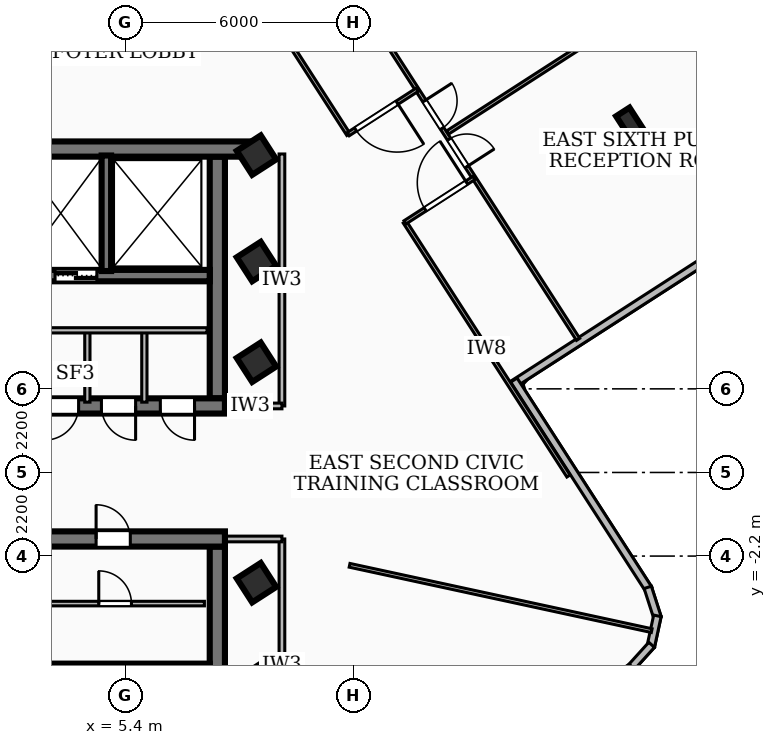
"""IFC4 building model, lengths in metres.
Left out: names, types, materials, properties, quantities, classifications, styles, units other than length and angle.
Written with IfcOpenShell. Run it as: python <this file> out.ifc"""

import sys

from ifc_helpers import new_model, si_unit, direction, frame, frame_2d, origin, origin_2d, place, context, subcontext, project, spatial, rectangle, i_section, extrude, element, fill, save


model = new_model("IFC4")
c1 = context("Model", 3, precision=1e-05, world=origin(), true_north=direction((0.0, 1.0)))
c2 = subcontext(c1, "Body", "Model", "MODEL_VIEW")
j1 = project(units=[si_unit("LENGTHUNIT", "METRE"), si_unit("PLANEANGLEUNIT", "RADIAN")], contexts=[c1])
p1 = place(None, origin())
s1 = spatial("IfcSite", under=j1, at=p1, CompositionType="ELEMENT")
p2 = place(p1, origin())
s2 = spatial("IfcBuilding", under=s1, at=p2, CompositionType="ELEMENT")
p3 = place(p2, frame((0.0, 0.0, 218.88)))
s3 = spatial("IfcBuildingStorey", under=s2, at=p3, CompositionType="ELEMENT", Elevation=218.88)
p4 = place(p3, frame((-8.78, 8.51, 0.0), z_axis=(0.0, 0.0, 1.0), x_axis=(1.0, 0.0, 0.0)))
e1 = element("IfcWall", 1, at=p4, inside=s3, PredefinedType="SHEAR", context=c2, shape_type="SweptSolid", body=[
    extrude(rectangle(XDim=17.56, YDim=0.4, at=frame_2d((8.78, 0.0))), origin(), (0.0, 0.0, 1.0), 3.14),
])
p5 = place(p3, frame((8.02, 1.75, 0.0), z_axis=(0.0, 0.0, 1.0), x_axis=(-1.0, 0.0, 0.0)))
e2 = element("IfcWall", 2, at=p5, inside=s3, PredefinedType="SHEAR", context=c2, shape_type="SweptSolid", body=[
    extrude(rectangle(XDim=16.04, YDim=0.4, at=frame_2d((8.02, 0.0))), origin(), (0.0, 0.0, 1.0), 3.14),
])
p6 = place(p5, frame((7.45, 0.0, 0.0)))
e3 = element("IfcOpeningElement", 3, at=p6, cuts=e2, PredefinedType="OPENING", context=c2, shape_type="SweptSolid", body=[
    extrude(rectangle(XDim=1.0, YDim=2.1, at=frame_2d((0.5, 1.05))), frame((0.0, 0.21, 0.0), z_axis=(0.0, -1.0, 0.0), x_axis=(1.0, 0.0, 0.0)), (0.0, 0.0, 1.0), 0.42),
])
p7 = place(p5, frame((14.285, 0.0, 0.0)))
e4 = element("IfcOpeningElement", 4, at=p7, cuts=e2, PredefinedType="OPENING", context=c2, shape_type="SweptSolid", body=[
    extrude(rectangle(XDim=1.05, YDim=2.15, at=frame_2d((0.525, 1.075))), frame((0.0, 0.21, 0.0), z_axis=(0.0, -1.0, 0.0), x_axis=(1.0, 0.0, 0.0)), (0.0, 0.0, 1.0), 0.42),
])
p8 = place(p5, frame((12.725, 0.0, 0.0)))
e5 = element("IfcOpeningElement", 5, at=p8, cuts=e2, PredefinedType="OPENING", context=c2, shape_type="SweptSolid", body=[
    extrude(rectangle(XDim=1.05, YDim=2.15, at=frame_2d((0.525, 1.075))), frame((0.0, 0.21, 0.0), z_axis=(0.0, -1.0, 0.0), x_axis=(1.0, 0.0, 0.0)), (0.0, 0.0, 1.0), 0.42),
])
p9 = place(p5, frame((11.165, 0.0, 0.0)))
e6 = element("IfcOpeningElement", 6, at=p9, cuts=e2, PredefinedType="OPENING", context=c2, shape_type="SweptSolid", body=[
    extrude(rectangle(XDim=1.05, YDim=2.15, at=frame_2d((0.525, 1.075))), frame((0.0, 0.21, 0.0), z_axis=(0.0, -1.0, 0.0), x_axis=(1.0, 0.0, 0.0)), (0.0, 0.0, 1.0), 0.42),
])
p10 = place(p5, frame((3.85, 0.0, 0.0)))
e7 = element("IfcOpeningElement", 7, at=p10, cuts=e2, PredefinedType="OPENING", context=c2, shape_type="SweptSolid", body=[
    extrude(rectangle(XDim=0.9, YDim=2.06, at=frame_2d((0.45, 1.03))), frame((0.0, 0.21, 0.0), z_axis=(0.0, -1.0, 0.0), x_axis=(1.0, 0.0, 0.0)), (0.0, 0.0, 1.0), 0.42),
])
p11 = place(p5, frame((2.35, 0.0, 0.0)))
e8 = element("IfcOpeningElement", 8, at=p11, cuts=e2, PredefinedType="OPENING", context=c2, shape_type="SweptSolid", body=[
    extrude(rectangle(XDim=0.9, YDim=2.06, at=frame_2d((0.45, 1.03))), frame((0.0, 0.21, 0.0), z_axis=(0.0, -1.0, 0.0), x_axis=(1.0, 0.0, 0.0)), (0.0, 0.0, 1.0), 0.42),
])
p12 = place(p5, frame((0.8, 0.0, 0.0)))
e9 = element("IfcOpeningElement", 9, at=p12, cuts=e2, PredefinedType="OPENING", context=c2, shape_type="SweptSolid", body=[
    extrude(rectangle(XDim=0.9, YDim=2.06, at=frame_2d((0.45, 1.03))), frame((0.0, 0.21, 0.0), z_axis=(0.0, -1.0, 0.0), x_axis=(1.0, 0.0, 0.0)), (0.0, 0.0, 1.0), 0.42),
])
p13 = place(p3, frame((7.82, 8.31, 0.0), z_axis=(0.0, 0.0, 1.0), x_axis=(0.0, -1.0, 0.0)))
e10 = element("IfcWall", 10, at=p13, inside=s3, PredefinedType="SHEAR", context=c2, shape_type="SweptSolid", body=[
    extrude(rectangle(XDim=6.36, YDim=0.4, at=frame_2d((3.18, 0.0))), origin(), (0.0, 0.0, 1.0), 3.14),
])
p14 = place(p3, frame((7.62, 5.18, 0.0), z_axis=(0.0, 0.0, 1.0), x_axis=(-1.0, 0.0, 0.0)))
e11 = element("IfcWall", 11, at=p14, inside=s3, PredefinedType="SOLIDWALL", context=c2, shape_type="SweptSolid", body=[
    extrude(rectangle(XDim=15.24, YDim=0.3, at=frame_2d((7.62, 0.0))), origin(), (0.0, 0.0, 1.0), 3.14),
])
p15 = place(p14, frame((5.77, 0.0, 0.0)))
e12 = element("IfcOpeningElement", 12, at=p15, cuts=e11, PredefinedType="OPENING", context=c2, shape_type="SweptSolid", body=[
    extrude(rectangle(XDim=1.1, YDim=2.15, at=frame_2d((0.55, 1.075))), frame((0.0, 0.16, 0.0), z_axis=(0.0, -1.0, 0.0), x_axis=(1.0, 0.0, 0.0)), (0.0, 0.0, 1.0), 0.32),
])
p16 = place(p14, frame((2.97, 0.0, 0.0)))
e13 = element("IfcOpeningElement", 13, at=p16, cuts=e11, PredefinedType="OPENING", context=c2, shape_type="SweptSolid", body=[
    extrude(rectangle(XDim=1.1, YDim=2.15, at=frame_2d((0.55, 1.075))), frame((0.0, 0.16, 0.0), z_axis=(0.0, -1.0, 0.0), x_axis=(1.0, 0.0, 0.0)), (0.0, 0.0, 1.0), 0.32),
])
p17 = place(p14, frame((7.97, 0.0, 0.0)))
e14 = element("IfcOpeningElement", 14, at=p17, cuts=e11, PredefinedType="OPENING", context=c2, shape_type="SweptSolid", body=[
    extrude(rectangle(XDim=1.0, YDim=2.1, at=frame_2d((0.5, 1.05))), frame((0.0, 0.16, 0.0), z_axis=(0.0, -1.0, 0.0), x_axis=(1.0, 0.0, 0.0)), (0.0, 0.0, 1.0), 0.32),
])
p18 = place(p3, frame((-8.02, -1.75, 0.0), z_axis=(0.0, 0.0, 1.0), x_axis=(1.0, 0.0, 0.0)))
e15 = element("IfcWall", 15, at=p18, inside=s3, PredefinedType="SHEAR", context=c2, shape_type="SweptSolid", body=[
    extrude(rectangle(XDim=16.04, YDim=0.4, at=frame_2d((8.02, 0.0))), origin(), (0.0, 0.0, 1.0), 3.14),
])
p19 = place(p18, frame((7.45, 0.0, 0.0)))
e16 = element("IfcOpeningElement", 16, at=p19, cuts=e15, PredefinedType="OPENING", context=c2, shape_type="SweptSolid", body=[
    extrude(rectangle(XDim=1.0, YDim=2.1, at=frame_2d((0.5, 1.05))), frame((0.0, 0.21, 0.0), z_axis=(0.0, -1.0, 0.0), x_axis=(1.0, 0.0, 0.0)), (0.0, 0.0, 1.0), 0.42),
])
p20 = place(p18, frame((12.65, 0.0, 0.0)))
e17 = element("IfcOpeningElement", 17, at=p20, cuts=e15, PredefinedType="OPENING", context=c2, shape_type="SweptSolid", body=[
    extrude(rectangle(XDim=0.9, YDim=2.06, at=frame_2d((0.45, 1.03))), frame((0.0, 0.21, 0.0), z_axis=(0.0, -1.0, 0.0), x_axis=(1.0, 0.0, 0.0)), (0.0, 0.0, 1.0), 0.42),
])
p21 = place(p18, frame((2.25, 0.0, 0.0)))
e18 = element("IfcOpeningElement", 18, at=p21, cuts=e15, PredefinedType="OPENING", context=c2, shape_type="SweptSolid", body=[
    extrude(rectangle(XDim=0.9, YDim=2.06, at=frame_2d((0.45, 1.03))), frame((0.0, 0.21, 0.0), z_axis=(0.0, -1.0, 0.0), x_axis=(1.0, 0.0, 0.0)), (0.0, 0.0, 1.0), 0.42),
])
p22 = place(p3, frame((7.82, -1.95, 0.0), z_axis=(0.0, 0.0, 1.0), x_axis=(0.0, -1.0, 0.0)))
e19 = element("IfcWall", 19, at=p22, inside=s3, PredefinedType="SHEAR", context=c2, shape_type="SweptSolid", body=[
    extrude(rectangle(XDim=6.36, YDim=0.4, at=frame_2d((3.18, 0.0))), origin(), (0.0, 0.0, 1.0), 3.14),
])
p23 = place(p3, frame((-7.62, -5.18, 0.0), z_axis=(0.0, 0.0, 1.0), x_axis=(1.0, 0.0, 0.0)))
e20 = element("IfcWall", 20, at=p23, inside=s3, PredefinedType="SOLIDWALL", context=c2, shape_type="SweptSolid", body=[
    extrude(rectangle(XDim=15.24, YDim=0.3, at=frame_2d((7.62, 0.0))), origin(), (0.0, 0.0, 1.0), 3.14),
])
p24 = place(p23, frame((5.77, 0.0, 0.0)))
e21 = element("IfcOpeningElement", 21, at=p24, cuts=e20, PredefinedType="OPENING", context=c2, shape_type="SweptSolid", body=[
    extrude(rectangle(XDim=1.1, YDim=2.15, at=frame_2d((0.55, 1.075))), frame((0.0, 0.16, 0.0), z_axis=(0.0, -1.0, 0.0), x_axis=(1.0, 0.0, 0.0)), (0.0, 0.0, 1.0), 0.32),
])
p25 = place(p23, frame((7.97, 0.0, 0.0)))
e22 = element("IfcOpeningElement", 22, at=p25, cuts=e20, PredefinedType="OPENING", context=c2, shape_type="SweptSolid", body=[
    extrude(rectangle(XDim=1.0, YDim=2.1, at=frame_2d((0.5, 1.05))), frame((0.0, 0.16, 0.0), z_axis=(0.0, -1.0, 0.0), x_axis=(1.0, 0.0, 0.0)), (0.0, 0.0, 1.0), 0.32),
])
p26 = place(p3, frame((4.9, 5.3, 0.0), z_axis=(0.0, 0.0, 1.0), x_axis=(0.0, 1.0, 0.0)))
e23 = element("IfcWall", 23, at=p26, inside=s3, PredefinedType="SOLIDWALL", context=c2, shape_type="SweptSolid", body=[
    extrude(rectangle(XDim=3.04, YDim=0.25, at=frame_2d((1.52, 0.0))), origin(), (0.0, 0.0, 1.0), 3.14),
])
for number, where, z_axis, x_axis in (
    (24, (8.85, -5.55, 0.0), (0.0, 0.0, 1.0), (0.841, 0.542, 0.0)),
    (25, (8.85, -2.9, 0.0), (0.0, 0.0, 1.0), (0.841, 0.542, 0.0)),
    (26, (8.85, 2.9, 0.0), (0.0, 0.0, 1.0), (0.841, 0.542, 0.0)),
    (27, (8.85, 5.55, 0.0), (0.0, 0.0, 1.0), (0.841, 0.542, 0.0)),
    (28, (8.85, 8.35, 0.0), (0.0, 0.0, 1.0), (0.841, 0.542, 0.0)),
):
    element("IfcColumn", number, at=place(p3, frame(where, z_axis=z_axis, x_axis=x_axis)), inside=s3, PredefinedType="COLUMN", context=c2, shape_type="SweptSolid", body=[
        extrude(rectangle(XDim=0.75, YDim=0.75, at=origin_2d()), origin(), (0.0, 0.0, 1.0), 3.42),
    ])
p27 = place(p3, frame((18.741, 9.097, 0.0), z_axis=(0.0, 0.0, 1.0), x_axis=(0.840566603496, 0.541708210283, 0.0)))
e29 = element("IfcColumn", 29, at=p27, inside=s3, PredefinedType="COLUMN", context=c2, shape_type="SweptSolid", body=[
    extrude(i_section(OverallWidth=0.418, OverallDepth=0.927, WebThickness=0.019, FlangeThickness=0.032, at=origin_2d()), origin(), (0.0, 0.0, 1.0), 3.42),
])
p28 = place(p3, frame((18.155, 17.425, 0.0), z_axis=(0.0, 0.0, 1.0), x_axis=(0.541713039183, -0.840563491462, 0.0)))
e30 = element("IfcWall", 30, at=p28, inside=s3, PredefinedType="SOLIDWALL", context=c2, shape_type="SweptSolid", body=[
    extrude(rectangle(XDim=9.824, YDim=0.2, at=frame_2d((4.912, 0.0))), origin(), (0.0, 0.0, 1.0), 3.14),
])
p29 = place(p28, frame((6.313, 0.0, 0.85)))
e31 = element("IfcOpeningElement", 31, at=p29, cuts=e30, PredefinedType="OPENING", context=c2, shape_type="SweptSolid", body=[
    extrude(rectangle(XDim=2.7, YDim=1.65, at=frame_2d((1.35, 0.825))), frame((0.0, 0.11, 0.0), z_axis=(0.0, -1.0, 0.0), x_axis=(1.0, 0.0, 0.0)), (0.0, 0.0, 1.0), 0.22),
])
p30 = place(p3, frame((23.032, 7.111, 0.0), z_axis=(0.0, 0.0, 1.0), x_axis=(-0.840540020681, -0.541749456515, 0.0)))
e32 = element("IfcWall", 32, at=p30, inside=s3, PredefinedType="SOLIDWALL", context=c2, shape_type="SweptSolid", body=[
    extrude(rectangle(XDim=8.842, YDim=0.2, at=frame_2d((4.421, 0.0))), origin(), (0.0, 0.0, 1.0), 3.14),
])
p31 = place(p30, frame((0.85, 0.0, 0.85)))
e33 = element("IfcOpeningElement", 33, at=p31, cuts=e32, PredefinedType="OPENING", context=c2, shape_type="SweptSolid", body=[
    extrude(rectangle(XDim=1.5, YDim=1.8, at=frame_2d((0.75, 0.9))), frame((0.0, 0.11, 0.0), z_axis=(0.0, -1.0, 0.0), x_axis=(1.0, 0.0, 0.0)), (0.0, 0.0, 1.0), 0.22),
])
p32 = place(p3, frame((15.624, 2.431, 0.0), z_axis=(0.0, 0.0, 1.0), x_axis=(0.541715396451, -0.840561972283, 0.0)))
e34 = element("IfcWall", 34, at=p32, inside=s3, PredefinedType="SOLIDWALL", context=c2, shape_type="SweptSolid", body=[
    extrude(rectangle(XDim=6.542, YDim=0.2, at=frame_2d((3.271, 0.0))), origin(), (0.0, 0.0, 1.0), 3.14),
])
p33 = place(p3, frame((19.146, -3.023, 0.0), z_axis=(0.0, 0.0, 1.0), x_axis=(0.306602907463, -0.951837516142, 0.0)))
e35 = element("IfcWall", 35, at=p33, inside=s3, PredefinedType="SOLIDWALL", context=c2, shape_type="SweptSolid", body=[
    extrude(rectangle(XDim=0.838, YDim=0.2, at=frame_2d((0.419, 0.0))), origin(), (0.0, 0.0, 1.0), 3.14),
])
p34 = place(p3, frame((19.4, -3.773, 0.0), z_axis=(0.0, 0.0, 1.0), x_axis=(-0.211087829535, -0.977467098281, 0.0)))
e36 = element("IfcWall", 36, at=p34, inside=s3, PredefinedType="SOLIDWALL", context=c2, shape_type="SweptSolid", body=[
    extrude(rectangle(XDim=0.823, YDim=0.2, at=frame_2d((0.412, 0.0))), origin(), (0.0, 0.0, 1.0), 3.14),
])
p35 = place(p3, frame((19.248, -4.535, 0.0), z_axis=(0.0, 0.0, 1.0), x_axis=(-0.671019988703, -0.741439258983, 0.0)))
e37 = element("IfcWall", 37, at=p35, inside=s3, PredefinedType="SOLIDWALL", context=c2, shape_type="SweptSolid", body=[
    extrude(rectangle(XDim=0.839, YDim=0.2, at=frame_2d((0.419, 0.0))), origin(), (0.0, 0.0, 1.0), 3.14),
])
p36 = place(p3, frame((18.723, -5.124, 0.0), z_axis=(0.0, 0.0, 1.0), x_axis=(-0.840584959151, -0.541679726821, 0.0)))
e38 = element("IfcWall", 38, at=p36, inside=s3, PredefinedType="SOLIDWALL", context=c2, shape_type="SweptSolid", body=[
    extrude(rectangle(XDim=6.742, YDim=0.2, at=frame_2d((3.371, 0.0))), origin(), (0.0, 0.0, 1.0), 3.14),
])
p37 = place(p3, frame((2.9, 3.74, 0.0), z_axis=(0.0, 0.0, 1.0), x_axis=(1.0, 0.0, 0.0)))
e39 = element("IfcWall", 39, at=p37, inside=s3, PredefinedType="PARTITIONING", context=c2, shape_type="SweptSolid", body=[
    extrude(rectangle(XDim=4.65, YDim=0.138, at=frame_2d((2.325, 0.0))), origin(), (0.0, 0.0, 1.0), 3.14),
])
p38 = place(p3, frame((2.8, -3.45, 0.0), z_axis=(0.0, 0.0, 1.0), x_axis=(1.0, 0.0, 0.0)))
e40 = element("IfcWall", 40, at=p38, inside=s3, PredefinedType="PARTITIONING", context=c2, shape_type="SweptSolid", body=[
    extrude(rectangle(XDim=4.68, YDim=0.12, at=frame_2d((2.34, 0.0))), origin(), (0.0, 0.0, 1.0), 3.14),
])
p39 = place(p38, frame((1.9, 0.0, 0.0)))
e41 = element("IfcOpeningElement", 41, at=p39, cuts=e40, PredefinedType="OPENING", context=c2, shape_type="SweptSolid", body=[
    extrude(rectangle(XDim=0.86, YDim=2.04, at=frame_2d((0.43, 1.02))), frame((0.0, 0.07, 0.0), z_axis=(0.0, -1.0, 0.0), x_axis=(1.0, 0.0, 0.0)), (0.0, 0.0, 1.0), 0.14),
])
for number, where, z_axis, x_axis in (
    (42, (4.4, 1.85, 0.0), (0.0, 0.0, 1.0), (0.0, 1.0, 0.0)),
    (43, (5.9, 1.85, 0.0), (0.0, 0.0, 1.0), (0.0, 1.0, 0.0)),
):
    element("IfcWall", number, at=place(p3, frame(where, z_axis=z_axis, x_axis=x_axis)), inside=s3, PredefinedType="PARTITIONING", context=c2, shape_type="SweptSolid", body=[
        extrude(rectangle(XDim=1.89, YDim=0.138, at=frame_2d((0.945, 0.0))), origin(), (0.0, 0.0, 1.0), 2.37),
    ])
p40 = place(p3, frame((9.52, 1.75, 0.0), z_axis=(0.0, 0.0, 1.0), x_axis=(0.0, 1.0, 0.0)))
e44 = element("IfcWall", 44, at=p40, inside=s3, PredefinedType="PARTITIONING", context=c2, shape_type="SweptSolid", body=[
    extrude(rectangle(XDim=6.63, YDim=0.15, at=frame_2d((3.315, 0.0))), origin(), (0.0, 0.0, 1.0), 2.51),
])
p41 = place(p3, frame((7.85, 1.75, 0.0), z_axis=(0.0, 0.0, 1.0), x_axis=(1.0, 0.0, 0.0)))
e45 = element("IfcWall", 45, at=p41, inside=s3, PredefinedType="PARTITIONING", context=c2, shape_type="SweptSolid", body=[
    extrude(rectangle(XDim=1.67, YDim=0.15, at=frame_2d((0.835, 0.0))), origin(), (0.0, 0.0, 1.0), 2.37),
])
p42 = place(p3, frame((9.52, -8.38, 0.0), z_axis=(0.0, 0.0, 1.0), x_axis=(0.0, 1.0, 0.0)))
e46 = element("IfcWall", 46, at=p42, inside=s3, PredefinedType="PARTITIONING", context=c2, shape_type="SweptSolid", body=[
    extrude(rectangle(XDim=6.63, YDim=0.15, at=frame_2d((3.315, 0.0))), origin(), (0.0, 0.0, 1.0), 3.14),
])
p43 = place(p3, frame((7.85, -1.75, 0.0), z_axis=(0.0, 0.0, 1.0), x_axis=(1.0, 0.0, 0.0)))
e47 = element("IfcWall", 47, at=p43, inside=s3, PredefinedType="PARTITIONING", context=c2, shape_type="SweptSolid", body=[
    extrude(rectangle(XDim=1.67, YDim=0.15, at=frame_2d((0.835, 0.0))), origin(), (0.0, 0.0, 1.0), 2.37),
])
p44 = place(p3, frame((11.3, -2.443, 0.0), z_axis=(0.0, 0.0, 1.0), x_axis=(0.977411986974, -0.211342867681, 0.0)))
e48 = element("IfcWall", 48, at=p44, inside=s3, PredefinedType="PARTITIONING", context=c2, shape_type="SweptSolid", body=[
    extrude(rectangle(XDim=8.134, YDim=0.1, at=frame_2d((4.067, 0.0))), origin(), (0.0, 0.0, 1.0), 3.14),
])
p45 = place(p3, frame((11.27, 8.893, 0.0), z_axis=(0.0, 0.0, 1.0), x_axis=(-0.541761070726, 0.840532534912, 0.0)))
e49 = element("IfcWall", 49, at=p45, inside=s3, PredefinedType="PARTITIONING", context=c2, shape_type="SweptSolid", body=[
    extrude(rectangle(XDim=8.149, YDim=0.1, at=frame_2d((4.075, 0.0))), origin(), (0.0, 0.0, 1.0), 2.51),
])
p46 = place(p3, frame((17.06, -0.093, 0.0), z_axis=(0.0, 0.0, 1.0), x_axis=(-0.541691689426, 0.840577250232, 0.0)))
e50 = element("IfcWall", 50, at=p46, inside=s3, PredefinedType="PARTITIONING", context=c2, shape_type="SweptSolid", body=[
    extrude(rectangle(XDim=7.949, YDim=0.1, at=frame_2d((3.975, 0.0))), origin(), (0.0, 0.0, 1.0), 3.14),
])
p47 = place(p3, frame((13.08, 10.071, 0.0), z_axis=(0.0, 0.0, 1.0), x_axis=(-0.840623628822, -0.541619714067, 0.0)))
e51 = element("IfcWall", 51, at=p47, inside=s3, PredefinedType="PARTITIONING", context=c2, shape_type="SweptSolid", body=[
    extrude(rectangle(XDim=2.16, YDim=0.1, at=frame_2d((1.08, 0.0))), origin(), (0.0, 0.0, 1.0), 3.14),
])
p48 = place(p47, frame((0.63, 0.0, 0.0)))
e52 = element("IfcOpeningElement", 52, at=p48, cuts=e51, PredefinedType="OPENING", context=c2, shape_type="SweptSolid", body=[
    extrude(rectangle(XDim=1.3, YDim=2.1, at=frame_2d((0.65, 1.05))), frame((0.0, 0.06, 0.0), z_axis=(0.0, -1.0, 0.0), x_axis=(1.0, 0.0, 0.0)), (0.0, 0.0, 1.0), 0.12),
])
p49 = place(p3, frame((12.759, 6.581, 0.0), z_axis=(0.0, 0.0, 1.0), x_axis=(0.840641931508, 0.541591306236, 0.0)))
e53 = element("IfcWall", 53, at=p49, inside=s3, PredefinedType="PARTITIONING", context=c2, shape_type="SweptSolid", body=[
    extrude(rectangle(XDim=2.16, YDim=0.1, at=frame_2d((1.08, 0.0))), origin(), (0.0, 0.0, 1.0), 3.14),
])
p50 = place(p49, frame((0.63, 0.0, 0.0)))
e54 = element("IfcOpeningElement", 54, at=p50, cuts=e53, PredefinedType="OPENING", context=c2, shape_type="SweptSolid", body=[
    extrude(rectangle(XDim=1.3, YDim=2.1, at=frame_2d((0.65, 1.05))), frame((0.0, 0.06, 0.0), z_axis=(0.0, -1.0, 0.0), x_axis=(1.0, 0.0, 0.0)), (0.0, 0.0, 1.0), 0.12),
])
p51 = place(p3, frame((13.878, 8.944, 0.0), z_axis=(0.0, 0.0, 1.0), x_axis=(0.840576508336, 0.541692840671, 0.0)))
e55 = element("IfcWall", 55, at=p51, inside=s3, PredefinedType="PARTITIONING", context=c2, shape_type="SweptSolid", body=[
    extrude(rectangle(XDim=8.124, YDim=0.1, at=frame_2d((4.062, 0.0))), origin(), (0.0, 0.0, 1.0), 2.669),
])
p52 = place(p3, frame((10.449, 14.152, 0.0), z_axis=(0.0, 0.0, 1.0), x_axis=(0.541734007753, -0.8405499776, 0.0)))
e56 = element("IfcWall", 56, at=p52, inside=s3, PredefinedType="PARTITIONING", context=c2, shape_type="SweptSolid", body=[
    extrude(rectangle(XDim=12.67, YDim=0.1, at=frame_2d((6.335, 0.0))), origin(), (0.0, 0.0, 1.0), 2.51),
])
p53 = place(p52, frame((6.405, 0.0, 0.0)))
e57 = element("IfcOpeningElement", 57, at=p53, cuts=e56, PredefinedType="OPENING", context=c2, shape_type="SweptSolid", body=[
    extrude(rectangle(XDim=0.86, YDim=2.04, at=frame_2d((0.43, 1.02))), frame((0.0, 0.06, 0.0), z_axis=(0.0, -1.0, 0.0), x_axis=(1.0, 0.0, 0.0)), (0.0, 0.0, 1.0), 0.12),
])
p54 = place(p52, frame((5.205, 0.0, 0.0)))
e58 = element("IfcOpeningElement", 58, at=p54, cuts=e56, PredefinedType="OPENING", context=c2, shape_type="SweptSolid", body=[
    extrude(rectangle(XDim=0.86, YDim=2.04, at=frame_2d((0.43, 1.02))), frame((0.0, 0.06, 0.0), z_axis=(0.0, -1.0, 0.0), x_axis=(1.0, 0.0, 0.0)), (0.0, 0.0, 1.0), 0.12),
])
p55 = place(p16, origin())
e59 = element("IfcDoor", 59, at=p55, inside=s3, OperationType="DOUBLE_DOOR_SLIDING", PredefinedType="DOOR", context=c2, shape_type="SweptSolid", body=[
    extrude(rectangle(XDim=1.1, YDim=2.15, at=frame_2d((0.55, 1.075))), frame((0.0, 0.025, 0.0), z_axis=(0.0, -1.0, 0.0), x_axis=(1.0, 0.0, 0.0)), (0.0, 0.0, 1.0), 0.05),
])
fill(e13, e59)
p56 = place(p20, origin())
e60 = element("IfcDoor", 60, at=p56, inside=s3, OperationType="SINGLE_SWING_LEFT", PredefinedType="DOOR", context=c2, shape_type="SweptSolid", body=[
    extrude(rectangle(XDim=0.9, YDim=2.06, at=frame_2d((0.45, 1.03))), frame((0.0, 0.025, 0.0), z_axis=(0.0, -1.0, 0.0), x_axis=(1.0, 0.0, 0.0)), (0.0, 0.0, 1.0), 0.05),
])
fill(e17, e60)
p57 = place(p10, origin())
e61 = element("IfcDoor", 61, at=p57, inside=s3, OperationType="SINGLE_SWING_RIGHT", PredefinedType="DOOR", context=c2, shape_type="SweptSolid", body=[
    extrude(rectangle(XDim=0.9, YDim=2.06, at=frame_2d((0.45, 1.03))), frame((0.0, 0.025, 0.0), z_axis=(0.0, -1.0, 0.0), x_axis=(1.0, 0.0, 0.0)), (0.0, 0.0, 1.0), 0.05),
])
fill(e7, e61)
p58 = place(p11, origin())
e62 = element("IfcDoor", 62, at=p58, inside=s3, OperationType="SINGLE_SWING_LEFT", PredefinedType="DOOR", context=c2, shape_type="SweptSolid", body=[
    extrude(rectangle(XDim=0.9, YDim=2.06, at=frame_2d((0.45, 1.03))), frame((0.0, 0.025, 0.0), z_axis=(0.0, -1.0, 0.0), x_axis=(1.0, 0.0, 0.0)), (0.0, 0.0, 1.0), 0.05),
])
fill(e8, e62)
p59 = place(p12, origin())
e63 = element("IfcDoor", 63, at=p59, inside=s3, OperationType="SINGLE_SWING_LEFT", PredefinedType="DOOR", context=c2, shape_type="SweptSolid", body=[
    extrude(rectangle(XDim=0.9, YDim=2.06, at=frame_2d((0.45, 1.03))), frame((0.0, 0.025, 0.0), z_axis=(0.0, -1.0, 0.0), x_axis=(1.0, 0.0, 0.0)), (0.0, 0.0, 1.0), 0.05),
])
fill(e9, e63)
p60 = place(p39, origin())
e64 = element("IfcDoor", 64, at=p60, inside=s3, OperationType="SINGLE_SWING_LEFT", PredefinedType="DOOR", context=c2, shape_type="SweptSolid", body=[
    extrude(rectangle(XDim=0.86, YDim=2.04, at=frame_2d((0.43, 1.02))), frame((0.0, 0.025, 0.0), z_axis=(0.0, -1.0, 0.0), x_axis=(1.0, 0.0, 0.0)), (0.0, 0.0, 1.0), 0.05),
])
fill(e41, e64)
p61 = place(p48, origin())
e65 = element("IfcDoor", 65, at=p61, inside=s3, OperationType="SINGLE_SWING_LEFT", PredefinedType="DOOR", context=c2, shape_type="SweptSolid", body=[
    extrude(rectangle(XDim=1.3, YDim=2.1, at=frame_2d((0.65, 1.05))), frame((0.0, 0.025, 0.0), z_axis=(0.0, -1.0, 0.0), x_axis=(1.0, 0.0, 0.0)), (0.0, 0.0, 1.0), 0.05),
])
fill(e52, e65)
p62 = place(p50, origin())
e66 = element("IfcDoor", 66, at=p62, inside=s3, OperationType="SINGLE_SWING_RIGHT", PredefinedType="DOOR", context=c2, shape_type="SweptSolid", body=[
    extrude(rectangle(XDim=1.3, YDim=2.1, at=frame_2d((0.65, 1.05))), frame((0.0, 0.025, 0.0), z_axis=(0.0, -1.0, 0.0), x_axis=(1.0, 0.0, 0.0)), (0.0, 0.0, 1.0), 0.05),
])
fill(e54, e66)
p63 = place(p53, origin())
e67 = element("IfcDoor", 67, at=p63, inside=s3, OperationType="SINGLE_SWING_RIGHT", PredefinedType="DOOR", context=c2, shape_type="SweptSolid", body=[
    extrude(rectangle(XDim=0.86, YDim=2.04, at=frame_2d((0.43, 1.02))), frame((0.0, 0.025, 0.0), z_axis=(0.0, -1.0, 0.0), x_axis=(1.0, 0.0, 0.0)), (0.0, 0.0, 1.0), 0.05),
])
fill(e57, e67)
p64 = place(p54, origin())
e68 = element("IfcDoor", 68, at=p64, inside=s3, OperationType="SINGLE_SWING_LEFT", PredefinedType="DOOR", context=c2, shape_type="SweptSolid", body=[
    extrude(rectangle(XDim=0.86, YDim=2.04, at=frame_2d((0.43, 1.02))), frame((0.0, 0.025, 0.0), z_axis=(0.0, -1.0, 0.0), x_axis=(1.0, 0.0, 0.0)), (0.0, 0.0, 1.0), 0.05),
])
fill(e58, e68)
save(model, sys.argv[1])
